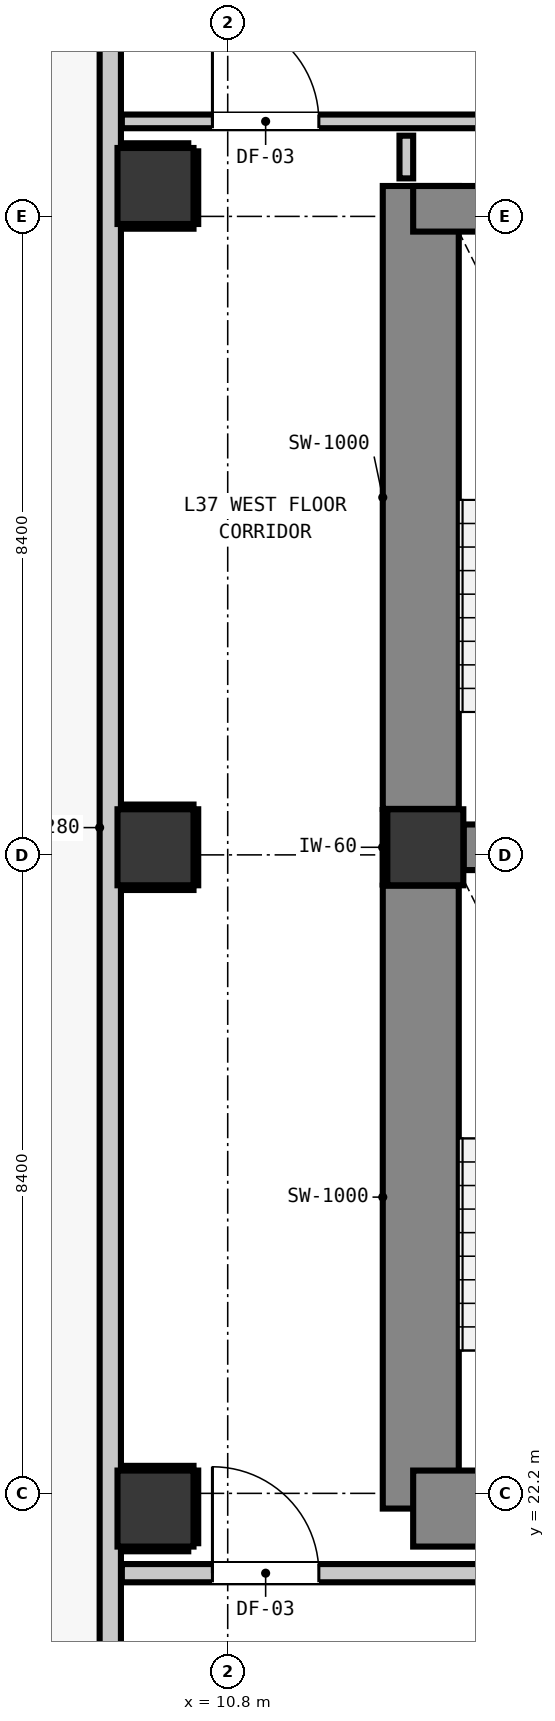
"""IFC4 building model, lengths in metres.
Left out: names, types, materials, properties, quantities, classifications, styles, units other than length and angle.
Written with IfcOpenShell. Run it as: python <this file> out.ifc"""

import sys

from ifc_helpers import new_model, si_unit, direction, frame, frame_2d, origin, origin_2d, place, context, subcontext, project, spatial, rectangle, extrude, element, fill, save


model = new_model("IFC4")
c1 = context("Model", 3, precision=1e-05, world=origin(), true_north=direction((0.0, 1.0)))
c2 = subcontext(c1, "Body", "Model", "MODEL_VIEW")
j1 = project(units=[si_unit("LENGTHUNIT", "METRE"), si_unit("PLANEANGLEUNIT", "RADIAN")], contexts=[c1])
p1 = place(None, origin())
s1 = spatial("IfcSite", under=j1, at=p1, CompositionType="ELEMENT")
p2 = place(p1, origin())
s2 = spatial("IfcBuilding", under=s1, at=p2, CompositionType="ELEMENT")
p3 = place(p2, frame((0.0, 0.0, 129.32)))
s3 = spatial("IfcBuildingStorey", under=s2, at=p3, CompositionType="ELEMENT", Elevation=129.32)
p4 = place(p3, frame((13.4, 30.7, 0.0), z_axis=(0.0, 0.0, 1.0), x_axis=(1.0, 0.0, 0.0)))
e1 = element("IfcColumn", 1, at=p4, inside=s3, PredefinedType="COLUMN", context=c2, shape_type="SweptSolid", body=[
    extrude(rectangle(XDim=1.0, YDim=1.0, at=origin_2d()), origin(), (0.0, 0.0, 1.0), 3.32),
])
p5 = place(p3, frame((13.34, 22.0, 0.0), z_axis=(0.0, 0.0, 1.0), x_axis=(0.0, 1.0, 0.0)))
e2 = element("IfcWall", 2, at=p5, inside=s3, PredefinedType="SHEAR", context=c2, shape_type="SweptSolid", body=[
    extrude(rectangle(XDim=8.195, YDim=1.0, at=frame_2d((4.098, 0.0))), origin(), (0.0, 0.0, 1.0), 3.32),
])
p6 = place(p3, frame((13.34, 31.205, 0.0), z_axis=(0.0, 0.0, 1.0), x_axis=(0.0, 1.0, 0.0)))
e3 = element("IfcWall", 3, at=p6, inside=s3, PredefinedType="SHEAR", context=c2, shape_type="SweptSolid", body=[
    extrude(rectangle(XDim=8.195, YDim=1.0, at=frame_2d((4.097, 0.0))), origin(), (0.0, 0.0, 1.0), 3.32),
])
p7 = place(p3, frame((13.24, 22.0, 0.0), z_axis=(0.0, 0.0, 1.0), x_axis=(1.0, 0.0, 0.0)))
e4 = element("IfcWall", 4, at=p7, inside=s3, PredefinedType="SHEAR", context=c2, shape_type="SweptSolid", body=[
    extrude(rectangle(XDim=4.08, YDim=1.0, at=frame_2d((2.04, 0.0))), origin(), (0.0, 0.0, 1.0), 3.32),
])
p8 = place(p3, frame((13.24, 39.1, 0.0), z_axis=(0.0, 0.0, 1.0), x_axis=(1.0, 0.0, 0.0)))
e5 = element("IfcWall", 5, at=p8, inside=s3, PredefinedType="SHEAR", context=c2, shape_type="SweptSolid", body=[
    extrude(rectangle(XDim=4.08, YDim=0.6, at=frame_2d((2.04, 0.0))), origin(), (0.0, 0.0, 1.0), 3.32),
])
p9 = place(p3, frame((13.905, 30.7, 0.0), z_axis=(0.0, 0.0, 1.0), x_axis=(1.0, 0.0, 0.0)))
e6 = element("IfcWall", 6, at=p9, inside=s3, PredefinedType="SHEAR", context=c2, shape_type="SweptSolid", body=[
    extrude(rectangle(XDim=3.415, YDim=0.6, at=frame_2d((1.708, 0.0))), origin(), (0.0, 0.0, 1.0), 3.32),
])
for number, where, z_axis, x_axis in (
    (7, (9.85, 22.0, 0.0), (0.0, 0.0, 1.0), (1.0, 0.0, 0.0)),
    (8, (9.85, 30.7, 0.0), (0.0, 0.0, 1.0), (1.0, 0.0, 0.0)),
    (9, (9.85, 39.4, 0.0), (0.0, 0.0, 1.0), (1.0, 0.0, 0.0)),
):
    element("IfcColumn", number, at=place(p3, frame(where, z_axis=z_axis, x_axis=x_axis)), inside=s3, PredefinedType="COLUMN", context=c2, shape_type="SweptSolid", body=[
        extrude(rectangle(XDim=1.0, YDim=1.0, at=origin_2d()), origin(), (0.0, 0.0, 1.0), 3.32),
    ])
p10 = place(p3, frame((9.255, 11.355, 0.0), z_axis=(0.0, 0.0, 1.0), x_axis=(0.0, 1.0, 0.0)))
e10 = element("IfcWall", 10, at=p10, inside=s3, PredefinedType="STANDARD", context=c2, shape_type="SweptSolid", body=[
    extrude(rectangle(XDim=32.29, YDim=0.28, at=frame_2d((16.145, 0.0))), origin(), (0.0, 0.0, 1.0), 3.08),
])
p11 = place(p10, frame((5.818, 0.0, 0.0)))
e11 = element("IfcOpeningElement", 11, at=p11, cuts=e10, PredefinedType="OPENING", context=c2, shape_type="SweptSolid", body=[
    extrude(rectangle(XDim=1.0, YDim=2.15, at=frame_2d((0.5, 1.075))), frame((0.0, 0.15, 0.0), z_axis=(0.0, -1.0, 0.0), x_axis=(1.0, 0.0, 0.0)), (0.0, 0.0, 1.0), 0.3),
])
p12 = place(p10, frame((0.544, 0.0, 0.85)))
e12 = element("IfcOpeningElement", 12, at=p12, cuts=e10, PredefinedType="OPENING", context=c2, shape_type="SweptSolid", body=[
    extrude(rectangle(XDim=1.05, YDim=1.65, at=frame_2d((0.525, 0.825))), frame((0.0, 0.15, 0.0), z_axis=(0.0, -1.0, 0.0), x_axis=(1.0, 0.0, 0.0)), (0.0, 0.0, 1.0), 0.3),
])
p13 = place(p3, frame((9.407, 21.15, 0.0), z_axis=(0.0, 0.0, 1.0), x_axis=(1.0, 0.0, 0.0)))
e13 = element("IfcWall", 13, at=p13, inside=s3, PredefinedType="PARTITIONING", context=c2, shape_type="SweptSolid", body=[
    extrude(rectangle(XDim=39.386, YDim=0.24, at=frame_2d((19.693, 0.0))), origin(), (0.0, 0.0, 1.0), 3.08),
])
p14 = place(p13, frame((8.803, 0.0, 0.0)))
e14 = element("IfcOpeningElement", 14, at=p14, cuts=e13, PredefinedType="OPENING", context=c2, shape_type="SweptSolid", body=[
    extrude(rectangle(XDim=1.1, YDim=2.15, at=frame_2d((0.55, 1.075))), frame((0.0, 0.13, 0.0), z_axis=(0.0, -1.0, 0.0), x_axis=(1.0, 0.0, 0.0)), (0.0, 0.0, 1.0), 0.26),
])
p15 = place(p13, frame((1.192, 0.0, 0.0)))
e15 = element("IfcOpeningElement", 15, at=p15, cuts=e13, PredefinedType="OPENING", context=c2, shape_type="SweptSolid", body=[
    extrude(rectangle(XDim=1.4, YDim=2.15, at=frame_2d((0.7, 1.075))), frame((0.0, 0.13, 0.0), z_axis=(0.0, -1.0, 0.0), x_axis=(1.0, 0.0, 0.0)), (0.0, 0.0, 1.0), 0.26),
])
p16 = place(p13, frame((28.643, 0.0, 0.0)))
e16 = element("IfcOpeningElement", 16, at=p16, cuts=e13, PredefinedType="OPENING", context=c2, shape_type="SweptSolid", body=[
    extrude(rectangle(XDim=1.4, YDim=2.15, at=frame_2d((0.7, 1.075))), frame((0.0, 0.13, 0.0), z_axis=(0.0, -1.0, 0.0), x_axis=(1.0, 0.0, 0.0)), (0.0, 0.0, 1.0), 0.26),
])
p17 = place(p3, frame((9.407, 40.25, 0.0), z_axis=(0.0, 0.0, 1.0), x_axis=(1.0, 0.0, 0.0)))
e17 = element("IfcWall", 17, at=p17, inside=s3, PredefinedType="PARTITIONING", context=c2, shape_type="SweptSolid", body=[
    extrude(rectangle(XDim=27.536, YDim=0.18, at=frame_2d((13.768, 0.0))), origin(), (0.0, 0.0, 1.0), 3.08),
])
p18 = place(p17, frame((8.028, 0.0, 0.0)))
e18 = element("IfcOpeningElement", 18, at=p18, cuts=e17, PredefinedType="OPENING", context=c2, shape_type="SweptSolid", body=[
    extrude(rectangle(XDim=1.4, YDim=2.15, at=frame_2d((0.7, 1.075))), frame((0.0, 0.1, 0.0), z_axis=(0.0, -1.0, 0.0), x_axis=(1.0, 0.0, 0.0)), (0.0, 0.0, 1.0), 0.2),
])
p19 = place(p17, frame((1.192, 0.0, 0.0)))
e19 = element("IfcOpeningElement", 19, at=p19, cuts=e17, PredefinedType="OPENING", context=c2, shape_type="SweptSolid", body=[
    extrude(rectangle(XDim=1.4, YDim=2.15, at=frame_2d((0.7, 1.075))), frame((0.0, 0.1, 0.0), z_axis=(0.0, -1.0, 0.0), x_axis=(1.0, 0.0, 0.0)), (0.0, 0.0, 1.0), 0.2),
])
p20 = place(p3, frame((13.15, 39.5, 0.0), z_axis=(0.0, 0.0, 1.0), x_axis=(0.0, 1.0, 0.0)))
e20 = element("IfcWall", 20, at=p20, inside=s3, PredefinedType="PARTITIONING", context=c2, shape_type="SweptSolid", body=[
    extrude(rectangle(XDim=0.562, YDim=0.18, at=frame_2d((0.281, 0.0))), origin(), (0.0, 0.0, 1.0), 2.315),
])
p21 = place(p3, frame((12.868, 30.21, 0.0), z_axis=(0.0, 0.0, 1.0), x_axis=(0.0, 1.0, 0.0)))
e21 = element("IfcWall", 21, at=p21, inside=s3, PredefinedType="PARTITIONING", context=c2, shape_type="SweptSolid", body=[
    extrude(rectangle(XDim=0.98, YDim=0.06, at=frame_2d((0.49, 0.0))), origin(), (0.0, 0.0, 1.0), 1.45),
])
p22 = place(p3, frame((9.41, 21.468, 0.0), z_axis=(0.0, 0.0, 1.0), x_axis=(1.0, 0.0, 0.0)))
e22 = element("IfcWall", 22, at=p22, inside=s3, PredefinedType="PARTITIONING", context=c2, shape_type="SweptSolid", body=[
    extrude(rectangle(XDim=0.871, YDim=0.06, at=frame_2d((0.436, 0.0))), origin(), (0.0, 0.0, 1.0), 1.45),
])
p23 = place(p3, frame((9.41, 22.532, 0.0), z_axis=(0.0, 0.0, 1.0), x_axis=(1.0, 0.0, 0.0)))
e23 = element("IfcWall", 23, at=p23, inside=s3, PredefinedType="PARTITIONING", context=c2, shape_type="SweptSolid", body=[
    extrude(rectangle(XDim=0.94, YDim=0.06, at=frame_2d((0.47, 0.0))), origin(), (0.0, 0.0, 1.0), 1.45),
])
p24 = place(p3, frame((10.382, 21.544, 0.0), z_axis=(0.0, 0.0, 1.0), x_axis=(0.0, 1.0, 0.0)))
e24 = element("IfcWall", 24, at=p24, inside=s3, PredefinedType="PARTITIONING", context=c2, shape_type="SweptSolid", body=[
    extrude(rectangle(XDim=0.956, YDim=0.06, at=frame_2d((0.478, 0.0))), origin(), (0.0, 0.0, 1.0), 1.45),
])
for number, where, z_axis, x_axis in (
    (25, (9.41, 30.168, 0.0), (0.0, 0.0, 1.0), (1.0, 0.0, 0.0)),
    (26, (9.41, 31.232, 0.0), (0.0, 0.0, 1.0), (1.0, 0.0, 0.0)),
):
    element("IfcWall", number, at=place(p3, frame(where, z_axis=z_axis, x_axis=x_axis)), inside=s3, PredefinedType="PARTITIONING", context=c2, shape_type="SweptSolid", body=[
        extrude(rectangle(XDim=0.94, YDim=0.06, at=frame_2d((0.47, 0.0))), origin(), (0.0, 0.0, 1.0), 1.45),
    ])
p25 = place(p3, frame((10.382, 30.2, 0.0), z_axis=(0.0, 0.0, 1.0), x_axis=(0.0, 1.0, 0.0)))
e27 = element("IfcWall", 27, at=p25, inside=s3, PredefinedType="PARTITIONING", context=c2, shape_type="SweptSolid", body=[
    extrude(rectangle(XDim=1.0, YDim=0.06, at=frame_2d((0.5, 0.0))), origin(), (0.0, 0.0, 1.0), 1.45),
])
p26 = place(p3, frame((9.41, 38.868, 0.0), z_axis=(0.0, 0.0, 1.0), x_axis=(1.0, 0.0, 0.0)))
e28 = element("IfcWall", 28, at=p26, inside=s3, PredefinedType="PARTITIONING", context=c2, shape_type="SweptSolid", body=[
    extrude(rectangle(XDim=0.94, YDim=0.06, at=frame_2d((0.47, 0.0))), origin(), (0.0, 0.0, 1.0), 1.45),
])
p27 = place(p3, frame((9.41, 39.932, 0.0), z_axis=(0.0, 0.0, 1.0), x_axis=(1.0, 0.0, 0.0)))
e29 = element("IfcWall", 29, at=p27, inside=s3, PredefinedType="PARTITIONING", context=c2, shape_type="SweptSolid", body=[
    extrude(rectangle(XDim=0.871, YDim=0.06, at=frame_2d((0.436, 0.0))), origin(), (0.0, 0.0, 1.0), 1.45),
])
p28 = place(p3, frame((10.382, 38.9, 0.0), z_axis=(0.0, 0.0, 1.0), x_axis=(0.0, 1.0, 0.0)))
e30 = element("IfcWall", 30, at=p28, inside=s3, PredefinedType="PARTITIONING", context=c2, shape_type="SweptSolid", body=[
    extrude(rectangle(XDim=0.956, YDim=0.06, at=frame_2d((0.478, 0.0))), origin(), (0.0, 0.0, 1.0), 1.45),
])
p29 = place(p15, origin())
e31 = element("IfcDoor", 31, at=p29, inside=s3, OperationType="SINGLE_SWING_LEFT", PredefinedType="DOOR", context=c2, shape_type="SweptSolid", body=[
    extrude(rectangle(XDim=1.4, YDim=2.15, at=frame_2d((0.7, 1.075))), frame((0.0, 0.025, 0.0), z_axis=(0.0, -1.0, 0.0), x_axis=(1.0, 0.0, 0.0)), (0.0, 0.0, 1.0), 0.05),
])
fill(e15, e31)
p30 = place(p19, origin())
e32 = element("IfcDoor", 32, at=p30, inside=s3, OperationType="SINGLE_SWING_LEFT", PredefinedType="DOOR", context=c2, shape_type="SweptSolid", body=[
    extrude(rectangle(XDim=1.4, YDim=2.15, at=frame_2d((0.7, 1.075))), frame((0.0, 0.025, 0.0), z_axis=(0.0, -1.0, 0.0), x_axis=(1.0, 0.0, 0.0)), (0.0, 0.0, 1.0), 0.05),
])
fill(e19, e32)
save(model, sys.argv[1])
